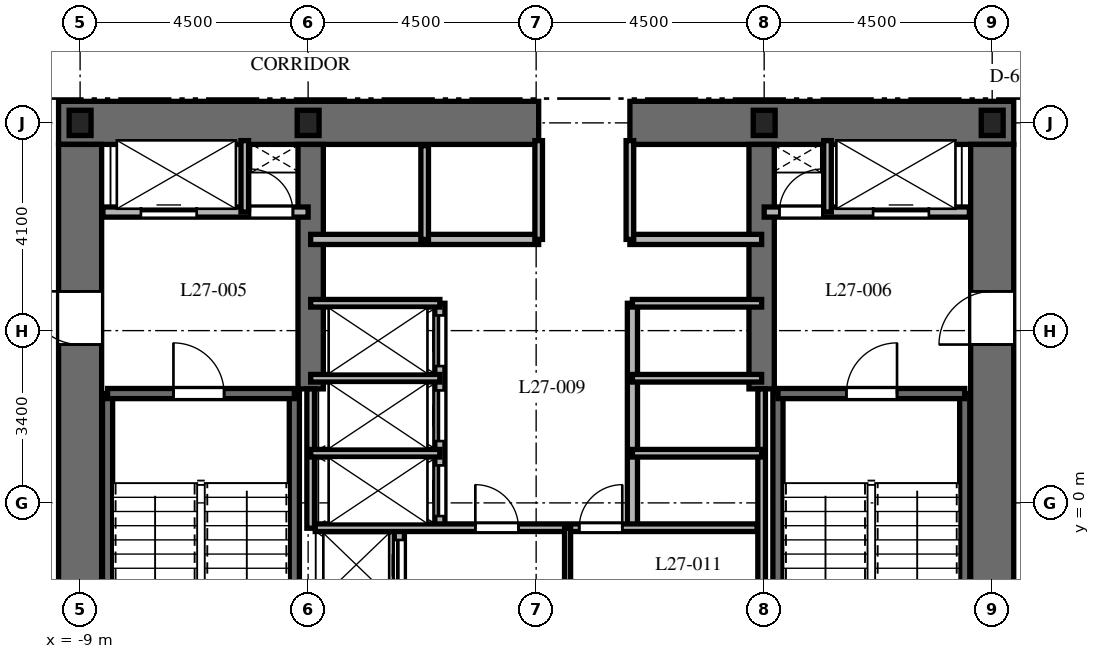
"""IFC4 building model, lengths in metres.
Left out: names, types, materials, properties, quantities, classifications, styles, units other than length and angle.
Written with IfcOpenShell. Run it as: python <this file> out.ifc"""

import sys

from ifc_helpers import new_model, si_unit, direction, frame, frame_2d, origin, origin_2d, place, context, subcontext, project, spatial, rectangle, i_section, extrude, element, fill, save


model = new_model("IFC4")
c1 = context("Model", 3, precision=1e-05, world=origin(), true_north=direction((0.0, 1.0)))
c2 = subcontext(c1, "Body", "Model", "MODEL_VIEW")
j1 = project(units=[si_unit("LENGTHUNIT", "METRE"), si_unit("PLANEANGLEUNIT", "RADIAN")], contexts=[c1])
p1 = place(None, origin())
s1 = spatial("IfcSite", under=j1, at=p1, CompositionType="ELEMENT")
p2 = place(p1, origin())
s2 = spatial("IfcBuilding", under=s1, at=p2, CompositionType="ELEMENT")
p3 = place(p2, frame((0.0, 0.0, 113.6)))
s3 = spatial("IfcBuildingStorey", under=s2, at=p3, CompositionType="ELEMENT", Elevation=113.6)
p4 = place(p3, frame((-9.425, 7.5, 0.0), z_axis=(0.0, 0.0, 1.0), x_axis=(1.0, 0.0, 0.0)))
e1 = element("IfcWall", 1, at=p4, inside=s3, PredefinedType="SHEAR", context=c2, shape_type="SweptSolid", body=[
    extrude(rectangle(XDim=9.475, YDim=0.85, at=frame_2d((4.738, 0.0))), origin(), (0.0, 0.0, 1.0), 3.7),
])
p5 = place(p3, frame((1.85, 7.5, 0.0), z_axis=(0.0, 0.0, 1.0), x_axis=(1.0, 0.0, 0.0)))
e2 = element("IfcWall", 2, at=p5, inside=s3, PredefinedType="SHEAR", context=c2, shape_type="SweptSolid", body=[
    extrude(rectangle(XDim=7.575, YDim=0.85, at=frame_2d((3.788, 0.0))), origin(), (0.0, 0.0, 1.0), 3.7),
])
p6 = place(p3, frame((-9.0, -7.075, 0.0), z_axis=(0.0, 0.0, 1.0), x_axis=(0.0, 1.0, 0.0)))
e3 = element("IfcWall", 3, at=p6, inside=s3, PredefinedType="SHEAR", context=c2, shape_type="SweptSolid", body=[
    extrude(rectangle(XDim=14.15, YDim=0.85, at=frame_2d((7.075, 0.0))), origin(), (0.0, 0.0, 1.0), 3.7),
])
p7 = place(p6, frame((10.2, 0.0, 0.0)))
e4 = element("IfcOpeningElement", 4, at=p7, cuts=e3, PredefinedType="OPENING", context=c2, shape_type="SweptSolid", body=[
    extrude(rectangle(XDim=1.05, YDim=2.15, at=frame_2d((0.525, 1.075))), frame((0.0, 0.435, 0.0), z_axis=(0.0, -1.0, 0.0), x_axis=(1.0, 0.0, 0.0)), (0.0, 0.0, 1.0), 0.87),
])
p8 = place(p3, frame((9.0, -7.075, 0.0), z_axis=(0.0, 0.0, 1.0), x_axis=(0.0, 1.0, 0.0)))
e5 = element("IfcWall", 5, at=p8, inside=s3, PredefinedType="SHEAR", context=c2, shape_type="SweptSolid", body=[
    extrude(rectangle(XDim=14.15, YDim=0.85, at=frame_2d((7.075, 0.0))), origin(), (0.0, 0.0, 1.0), 3.7),
])
p9 = place(p8, frame((10.2, 0.0, 0.0)))
e6 = element("IfcOpeningElement", 6, at=p9, cuts=e5, PredefinedType="OPENING", context=c2, shape_type="SweptSolid", body=[
    extrude(rectangle(XDim=1.05, YDim=2.15, at=frame_2d((0.525, 1.075))), frame((0.0, 0.435, 0.0), z_axis=(0.0, -1.0, 0.0), x_axis=(1.0, 0.0, 0.0)), (0.0, 0.0, 1.0), 0.87),
])
for number, where, z_axis, x_axis in (
    (7, (-4.45, 2.25, 0.0), (0.0, 0.0, 1.0), (0.0, 1.0, 0.0)),
    (8, (4.45, 2.25, 0.0), (0.0, 0.0, 1.0), (0.0, 1.0, 0.0)),
):
    element("IfcWall", number, at=place(p3, frame(where, z_axis=z_axis, x_axis=x_axis)), inside=s3, PredefinedType="SHEAR", context=c2, shape_type="SweptSolid", body=[
        extrude(rectangle(XDim=4.825, YDim=0.5, at=frame_2d((2.413, 0.0))), origin(), (0.0, 0.0, 1.0), 3.7),
    ])
for number, where, z_axis, x_axis in (
    (9, (-8.458, -6.985, 0.0), (0.0, 0.0, 1.0), (0.0, 1.0, 0.0)),
    (10, (-4.772, -6.985, 0.0), (0.0, 0.0, 1.0), (0.0, 1.0, 0.0)),
):
    element("IfcWall", number, at=place(p3, frame(where, z_axis=z_axis, x_axis=x_axis)), inside=s3, PredefinedType="SHEAR", context=c2, shape_type="SweptSolid", body=[
        extrude(rectangle(XDim=9.143, YDim=0.2, at=frame_2d((4.572, 0.0))), origin(), (0.0, 0.0, 1.0), 3.7),
    ])
p10 = place(p3, frame((-8.458, 2.158, 0.0), z_axis=(0.0, 0.0, 1.0), x_axis=(1.0, 0.0, 0.0)))
e11 = element("IfcWall", 11, at=p10, inside=s3, PredefinedType="SHEAR", context=c2, shape_type="SweptSolid", body=[
    extrude(rectangle(XDim=3.686, YDim=0.2, at=frame_2d((1.843, 0.0))), origin(), (0.0, 0.0, 1.0), 3.7),
])
p11 = place(p10, frame((1.3, 0.0, 0.0)))
e12 = element("IfcOpeningElement", 12, at=p11, cuts=e11, PredefinedType="OPENING", context=c2, shape_type="SweptSolid", body=[
    extrude(rectangle(XDim=1.0, YDim=2.15, at=frame_2d((0.5, 1.075))), frame((0.0, 0.11, 0.0), z_axis=(0.0, -1.0, 0.0), x_axis=(1.0, 0.0, 0.0)), (0.0, 0.0, 1.0), 0.22),
])
for number, where, z_axis, x_axis in (
    (13, (4.772, -6.985, 0.0), (0.0, 0.0, 1.0), (0.0, 1.0, 0.0)),
    (14, (8.458, -6.985, 0.0), (0.0, 0.0, 1.0), (0.0, 1.0, 0.0)),
):
    element("IfcWall", number, at=place(p3, frame(where, z_axis=z_axis, x_axis=x_axis)), inside=s3, PredefinedType="SHEAR", context=c2, shape_type="SweptSolid", body=[
        extrude(rectangle(XDim=9.143, YDim=0.2, at=frame_2d((4.572, 0.0))), origin(), (0.0, 0.0, 1.0), 3.7),
    ])
p12 = place(p3, frame((4.772, 2.158, 0.0), z_axis=(0.0, 0.0, 1.0), x_axis=(1.0, 0.0, 0.0)))
e15 = element("IfcWall", 15, at=p12, inside=s3, PredefinedType="SHEAR", context=c2, shape_type="SweptSolid", body=[
    extrude(rectangle(XDim=3.686, YDim=0.2, at=frame_2d((1.843, 0.0))), origin(), (0.0, 0.0, 1.0), 3.7),
])
p13 = place(p12, frame((1.35, 0.0, 0.0)))
e16 = element("IfcOpeningElement", 16, at=p13, cuts=e15, PredefinedType="OPENING", context=c2, shape_type="SweptSolid", body=[
    extrude(rectangle(XDim=1.0, YDim=2.15, at=frame_2d((0.5, 1.075))), frame((0.0, 0.11, 0.0), z_axis=(0.0, -1.0, 0.0), x_axis=(1.0, 0.0, 0.0)), (0.0, 0.0, 1.0), 0.22),
])
for number, where, z_axis, x_axis in (
    (17, (9.0, 7.5, 0.0), (0.0, 0.0, 1.0), (1.0, 0.0, 0.0)),
    (18, (4.5, 7.5, 0.0), (0.0, 0.0, 1.0), (1.0, 0.0, 0.0)),
    (19, (-4.5, 7.5, 0.0), (0.0, 0.0, 1.0), (1.0, 0.0, 0.0)),
    (20, (-9.0, 7.5, 0.0), (0.0, 0.0, 1.0), (1.0, 0.0, 0.0)),
):
    element("IfcColumn", number, at=place(p3, frame(where, z_axis=z_axis, x_axis=x_axis)), inside=s3, PredefinedType="COLUMN", context=c2, shape_type="SweptSolid", body=[
        extrude(i_section(OverallWidth=0.432, OverallDepth=0.498, WebThickness=0.056, FlangeThickness=0.089, at=origin_2d()), origin(), (0.0, 0.0, 1.0), 3.7),
    ])
p14 = place(p3, frame((-8.55, 5.74, 0.0), z_axis=(0.0, 0.0, 1.0), x_axis=(1.0, 0.0, 0.0)))
e21 = element("IfcWall", 21, at=p14, inside=s3, PredefinedType="PARTITIONING", context=c2, shape_type="SweptSolid", body=[
    extrude(rectangle(XDim=4.05, YDim=0.2, at=frame_2d((2.025, 0.0))), origin(), (0.0, 0.0, 1.0), 3.4),
])
p15 = place(p14, frame((0.75, 0.0, 0.0)))
e22 = element("IfcOpeningElement", 22, at=p15, cuts=e21, PredefinedType="OPENING", context=c2, shape_type="SweptSolid", body=[
    extrude(rectangle(XDim=1.1, YDim=2.2, at=frame_2d((0.55, 1.1))), frame((0.0, 0.11, 0.0), z_axis=(0.0, -1.0, 0.0), x_axis=(1.0, 0.0, 0.0)), (0.0, 0.0, 1.0), 0.22),
])
p16 = place(p14, frame((2.9, 0.0, 0.0)))
e23 = element("IfcOpeningElement", 23, at=p16, cuts=e21, PredefinedType="OPENING", context=c2, shape_type="SweptSolid", body=[
    extrude(rectangle(XDim=0.85, YDim=2.03, at=frame_2d((0.425, 1.015))), frame((0.0, 0.11, 0.0), z_axis=(0.0, -1.0, 0.0), x_axis=(1.0, 0.0, 0.0)), (0.0, 0.0, 1.0), 0.22),
])
p17 = place(p3, frame((-5.75, 5.74, 0.0), z_axis=(0.0, 0.0, 1.0), x_axis=(0.0, 1.0, 0.0)))
e24 = element("IfcWall", 24, at=p17, inside=s3, PredefinedType="PARTITIONING", context=c2, shape_type="SweptSolid", body=[
    extrude(rectangle(XDim=1.41, YDim=0.15, at=frame_2d((0.705, 0.0))), origin(), (0.0, 0.0, 1.0), 3.4),
])
p18 = place(p3, frame((4.5, 5.74, 0.0), z_axis=(0.0, 0.0, 1.0), x_axis=(1.0, 0.0, 0.0)))
e25 = element("IfcWall", 25, at=p18, inside=s3, PredefinedType="PARTITIONING", context=c2, shape_type="SweptSolid", body=[
    extrude(rectangle(XDim=4.05, YDim=0.2, at=frame_2d((2.025, 0.0))), origin(), (0.0, 0.0, 1.0), 3.4),
])
p19 = place(p18, frame((0.3, 0.0, 0.0)))
e26 = element("IfcOpeningElement", 26, at=p19, cuts=e25, PredefinedType="OPENING", context=c2, shape_type="SweptSolid", body=[
    extrude(rectangle(XDim=0.85, YDim=2.03, at=frame_2d((0.425, 1.015))), frame((0.0, 0.11, 0.0), z_axis=(0.0, -1.0, 0.0), x_axis=(1.0, 0.0, 0.0)), (0.0, 0.0, 1.0), 0.22),
])
p20 = place(p18, frame((2.15, 0.0, 0.0)))
e27 = element("IfcOpeningElement", 27, at=p20, cuts=e25, PredefinedType="OPENING", context=c2, shape_type="SweptSolid", body=[
    extrude(rectangle(XDim=1.1, YDim=2.2, at=frame_2d((0.55, 1.1))), frame((0.0, 0.11, 0.0), z_axis=(0.0, -1.0, 0.0), x_axis=(1.0, 0.0, 0.0)), (0.0, 0.0, 1.0), 0.22),
])
p21 = place(p3, frame((5.75, 5.74, 0.0), z_axis=(0.0, 0.0, 1.0), x_axis=(0.0, 1.0, 0.0)))
e28 = element("IfcWall", 28, at=p21, inside=s3, PredefinedType="PARTITIONING", context=c2, shape_type="SweptSolid", body=[
    extrude(rectangle(XDim=1.41, YDim=0.15, at=frame_2d((0.705, 0.0))), origin(), (0.0, 0.0, 1.0), 3.4),
])
p22 = place(p3, frame((-2.7, -1.972, 0.0), z_axis=(0.0, 0.0, 1.0), x_axis=(0.0, 1.0, 0.0)))
e29 = element("IfcWall", 29, at=p22, inside=s3, PredefinedType="PARTITIONING", context=c2, shape_type="SweptSolid", body=[
    extrude(rectangle(XDim=1.472, YDim=0.2, at=frame_2d((0.736, 0.0))), origin(), (0.0, 0.0, 1.0), 3.4),
])
p23 = place(p22, frame((0.24, 0.0, 0.0)))
e30 = element("IfcOpeningElement", 30, at=p23, cuts=e29, PredefinedType="OPENING", context=c2, shape_type="SweptSolid", body=[
    extrude(rectangle(XDim=1.0, YDim=2.2, at=frame_2d((0.5, 1.1))), frame((0.0, 0.11, 0.0), z_axis=(0.0, -1.0, 0.0), x_axis=(1.0, 0.0, 0.0)), (0.0, 0.0, 1.0), 0.22),
])
p24 = place(p3, frame((-4.45, 5.2, 0.0), z_axis=(0.0, 0.0, 1.0), x_axis=(1.0, 0.0, 0.0)))
e31 = element("IfcWall", 31, at=p24, inside=s3, PredefinedType="PARTITIONING", context=c2, shape_type="SweptSolid", body=[
    extrude(rectangle(XDim=4.5, YDim=0.2, at=frame_2d((2.25, 0.0))), origin(), (0.0, 0.0, 1.0), 3.4),
])
p25 = place(p3, frame((1.85, 5.2, 0.0), z_axis=(0.0, 0.0, 1.0), x_axis=(1.0, 0.0, 0.0)))
e32 = element("IfcWall", 32, at=p25, inside=s3, PredefinedType="PARTITIONING", context=c2, shape_type="SweptSolid", body=[
    extrude(rectangle(XDim=2.6, YDim=0.2, at=frame_2d((1.3, 0.0))), origin(), (0.0, 0.0, 1.0), 3.4),
])
p26 = place(p3, frame((-2.2, 5.2, 0.0), z_axis=(0.0, 0.0, 1.0), x_axis=(0.0, 1.0, 0.0)))
e33 = element("IfcWall", 33, at=p26, inside=s3, PredefinedType="PARTITIONING", context=c2, shape_type="SweptSolid", body=[
    extrude(rectangle(XDim=1.85, YDim=0.15, at=frame_2d((0.925, 0.0))), origin(), (0.0, 0.0, 1.0), 3.4),
])
for number, where, z_axis, x_axis in (
    (34, (0.05, 5.2, 0.0), (0.0, 0.0, 1.0), (0.0, 1.0, 0.0)),
    (35, (1.85, 5.2, 0.0), (0.0, 0.0, 1.0), (0.0, 1.0, 0.0)),
):
    element("IfcWall", number, at=place(p3, frame(where, z_axis=z_axis, x_axis=x_axis)), inside=s3, PredefinedType="PARTITIONING", context=c2, shape_type="SweptSolid", body=[
        extrude(rectangle(XDim=1.95, YDim=0.15, at=frame_2d((0.975, 0.0))), origin(), (0.0, 0.0, 1.0), 3.4),
    ])
p27 = place(p3, frame((-4.45, -0.5, 0.0), z_axis=(0.0, 0.0, 1.0), x_axis=(0.0, 1.0, 0.0)))
e36 = element("IfcWall", 36, at=p27, inside=s3, PredefinedType="PARTITIONING", context=c2, shape_type="SweptSolid", body=[
    extrude(rectangle(XDim=2.75, YDim=0.15, at=frame_2d((1.375, 0.0))), origin(), (0.0, 0.0, 1.0), 3.4),
])
p28 = place(p3, frame((4.45, -1.972, 0.0), z_axis=(0.0, 0.0, 1.0), x_axis=(0.0, 1.0, 0.0)))
e37 = element("IfcWall", 37, at=p28, inside=s3, PredefinedType="PARTITIONING", context=c2, shape_type="SweptSolid", body=[
    extrude(rectangle(XDim=4.222, YDim=0.15, at=frame_2d((2.111, 0.0))), origin(), (0.0, 0.0, 1.0), 3.4),
])
p29 = place(p3, frame((-1.9, -0.5, 0.0), z_axis=(0.0, 0.0, 1.0), x_axis=(0.0, 1.0, 0.0)))
e38 = element("IfcWall", 38, at=p29, inside=s3, PredefinedType="PARTITIONING", context=c2, shape_type="SweptSolid", body=[
    extrude(rectangle(XDim=4.44, YDim=0.2, at=frame_2d((2.22, 0.0))), origin(), (0.0, 0.0, 1.0), 3.4),
])
p30 = place(p29, frame((0.24, 0.0, 0.0)))
e39 = element("IfcOpeningElement", 39, at=p30, cuts=e38, PredefinedType="OPENING", context=c2, shape_type="SweptSolid", body=[
    extrude(rectangle(XDim=1.0, YDim=2.2, at=frame_2d((0.5, 1.1))), frame((0.0, 0.11, 0.0), z_axis=(0.0, -1.0, 0.0), x_axis=(1.0, 0.0, 0.0)), (0.0, 0.0, 1.0), 0.22),
])
p31 = place(p29, frame((1.72, 0.0, 0.0)))
e40 = element("IfcOpeningElement", 40, at=p31, cuts=e38, PredefinedType="OPENING", context=c2, shape_type="SweptSolid", body=[
    extrude(rectangle(XDim=1.0, YDim=2.2, at=frame_2d((0.5, 1.1))), frame((0.0, 0.11, 0.0), z_axis=(0.0, -1.0, 0.0), x_axis=(1.0, 0.0, 0.0)), (0.0, 0.0, 1.0), 0.22),
])
p32 = place(p29, frame((3.2, 0.0, 0.0)))
e41 = element("IfcOpeningElement", 41, at=p32, cuts=e38, PredefinedType="OPENING", context=c2, shape_type="SweptSolid", body=[
    extrude(rectangle(XDim=1.0, YDim=2.2, at=frame_2d((0.5, 1.1))), frame((0.0, 0.11, 0.0), z_axis=(0.0, -1.0, 0.0), x_axis=(1.0, 0.0, 0.0)), (0.0, 0.0, 1.0), 0.22),
])
for number, where, z_axis, x_axis in (
    (42, (-4.45, 3.94, 0.0), (0.0, 0.0, 1.0), (1.0, 0.0, 0.0)),
    (43, (-4.45, 0.98, 0.0), (0.0, 0.0, 1.0), (1.0, 0.0, 0.0)),
    (44, (-4.45, 2.46, 0.0), (0.0, 0.0, 1.0), (1.0, 0.0, 0.0)),
):
    element("IfcWall", number, at=place(p3, frame(where, z_axis=z_axis, x_axis=x_axis)), inside=s3, PredefinedType="PARTITIONING", context=c2, shape_type="SweptSolid", body=[
        extrude(rectangle(XDim=2.55, YDim=0.15, at=frame_2d((1.275, 0.0))), origin(), (0.0, 0.0, 1.0), 3.4),
    ])
p33 = place(p3, frame((1.9, -0.5, 0.0), z_axis=(0.0, 0.0, 1.0), x_axis=(0.0, 1.0, 0.0)))
e45 = element("IfcWall", 45, at=p33, inside=s3, PredefinedType="PARTITIONING", context=c2, shape_type="SweptSolid", body=[
    extrude(rectangle(XDim=4.44, YDim=0.2, at=frame_2d((2.22, 0.0))), origin(), (0.0, 0.0, 1.0), 3.4),
])
for number, where, z_axis, x_axis in (
    (46, (1.9, 3.94, 0.0), (0.0, 0.0, 1.0), (1.0, 0.0, 0.0)),
    (47, (1.9, 0.98, 0.0), (0.0, 0.0, 1.0), (1.0, 0.0, 0.0)),
    (48, (1.9, 2.46, 0.0), (0.0, 0.0, 1.0), (1.0, 0.0, 0.0)),
):
    element("IfcWall", number, at=place(p3, frame(where, z_axis=z_axis, x_axis=x_axis)), inside=s3, PredefinedType="PARTITIONING", context=c2, shape_type="SweptSolid", body=[
        extrude(rectangle(XDim=2.55, YDim=0.15, at=frame_2d((1.275, 0.0))), origin(), (0.0, 0.0, 1.0), 3.4),
    ])
p34 = place(p3, frame((-4.36, -0.49, 0.0), z_axis=(0.0, 0.0, 1.0), x_axis=(1.0, 0.0, 0.0)))
e49 = element("IfcWall", 49, at=p34, inside=s3, PredefinedType="PARTITIONING", context=c2, shape_type="SweptSolid", body=[
    extrude(rectangle(XDim=8.72, YDim=0.15, at=frame_2d((4.36, 0.0))), origin(), (0.0, 0.0, 1.0), 3.4),
])
p35 = place(p34, frame((3.16, 0.0, 0.0)))
e50 = element("IfcOpeningElement", 50, at=p35, cuts=e49, PredefinedType="OPENING", context=c2, shape_type="SweptSolid", body=[
    extrude(rectangle(XDim=0.85, YDim=2.03, at=frame_2d((0.425, 1.015))), frame((0.0, 0.085, 0.0), z_axis=(0.0, -1.0, 0.0), x_axis=(1.0, 0.0, 0.0)), (0.0, 0.0, 1.0), 0.17),
])
p36 = place(p34, frame((5.21, 0.0, 0.0)))
e51 = element("IfcOpeningElement", 51, at=p36, cuts=e49, PredefinedType="OPENING", context=c2, shape_type="SweptSolid", body=[
    extrude(rectangle(XDim=0.85, YDim=2.03, at=frame_2d((0.425, 1.015))), frame((0.0, 0.085, 0.0), z_axis=(0.0, -1.0, 0.0), x_axis=(1.0, 0.0, 0.0)), (0.0, 0.0, 1.0), 0.17),
])
p37 = place(p3, frame((0.62, -1.972, 0.0), z_axis=(0.0, 0.0, 1.0), x_axis=(0.0, 1.0, 0.0)))
e52 = element("IfcWall", 52, at=p37, inside=s3, PredefinedType="PARTITIONING", context=c2, shape_type="SweptSolid", body=[
    extrude(rectangle(XDim=1.472, YDim=0.12, at=frame_2d((0.736, 0.0))), origin(), (0.0, 0.0, 1.0), 3.4),
])
p38 = place(p11, origin())
e53 = element("IfcDoor", 53, at=p38, inside=s3, OperationType="SINGLE_SWING_LEFT", PredefinedType="DOOR", context=c2, shape_type="SweptSolid", body=[
    extrude(rectangle(XDim=1.0, YDim=2.15, at=frame_2d((0.5, 1.075))), frame((0.0, 0.025, 0.0), z_axis=(0.0, -1.0, 0.0), x_axis=(1.0, 0.0, 0.0)), (0.0, 0.0, 1.0), 0.05),
])
fill(e12, e53)
p39 = place(p13, origin())
e54 = element("IfcDoor", 54, at=p39, inside=s3, OperationType="SINGLE_SWING_RIGHT", PredefinedType="DOOR", context=c2, shape_type="SweptSolid", body=[
    extrude(rectangle(XDim=1.0, YDim=2.15, at=frame_2d((0.5, 1.075))), frame((0.0, 0.025, 0.0), z_axis=(0.0, -1.0, 0.0), x_axis=(1.0, 0.0, 0.0)), (0.0, 0.0, 1.0), 0.05),
])
fill(e16, e54)
p40 = place(p7, origin())
e55 = element("IfcDoor", 55, at=p40, inside=s3, OperationType="SINGLE_SWING_RIGHT", PredefinedType="DOOR", context=c2, shape_type="SweptSolid", body=[
    extrude(rectangle(XDim=1.05, YDim=2.15, at=frame_2d((0.525, 1.075))), frame((0.0, 0.025, 0.0), z_axis=(0.0, -1.0, 0.0), x_axis=(1.0, 0.0, 0.0)), (0.0, 0.0, 1.0), 0.05),
])
fill(e4, e55)
p41 = place(p9, origin())
e56 = element("IfcDoor", 56, at=p41, inside=s3, OperationType="SINGLE_SWING_LEFT", PredefinedType="DOOR", context=c2, shape_type="SweptSolid", body=[
    extrude(rectangle(XDim=1.05, YDim=2.15, at=frame_2d((0.525, 1.075))), frame((0.0, 0.025, 0.0), z_axis=(0.0, -1.0, 0.0), x_axis=(1.0, 0.0, 0.0)), (0.0, 0.0, 1.0), 0.05),
])
fill(e6, e56)
p42 = place(p15, origin())
e57 = element("IfcDoor", 57, at=p42, inside=s3, OperationType="SLIDING_TO_LEFT", PredefinedType="DOOR", context=c2, shape_type="SweptSolid", body=[
    extrude(rectangle(XDim=1.1, YDim=2.2, at=frame_2d((0.55, 1.1))), frame((0.0, 0.025, 0.0), z_axis=(0.0, -1.0, 0.0), x_axis=(1.0, 0.0, 0.0)), (0.0, 0.0, 1.0), 0.05),
])
fill(e22, e57)
p43 = place(p16, origin())
e58 = element("IfcDoor", 58, at=p43, inside=s3, OperationType="SINGLE_SWING_LEFT", PredefinedType="DOOR", context=c2, shape_type="SweptSolid", body=[
    extrude(rectangle(XDim=0.85, YDim=2.03, at=frame_2d((0.425, 1.015))), frame((0.0, 0.025, 0.0), z_axis=(0.0, -1.0, 0.0), x_axis=(1.0, 0.0, 0.0)), (0.0, 0.0, 1.0), 0.05),
])
fill(e23, e58)
p44 = place(p19, origin())
e59 = element("IfcDoor", 59, at=p44, inside=s3, OperationType="SINGLE_SWING_RIGHT", PredefinedType="DOOR", context=c2, shape_type="SweptSolid", body=[
    extrude(rectangle(XDim=0.85, YDim=2.03, at=frame_2d((0.425, 1.015))), frame((0.0, 0.025, 0.0), z_axis=(0.0, -1.0, 0.0), x_axis=(1.0, 0.0, 0.0)), (0.0, 0.0, 1.0), 0.05),
])
fill(e26, e59)
p45 = place(p20, origin())
e60 = element("IfcDoor", 60, at=p45, inside=s3, OperationType="SLIDING_TO_RIGHT", PredefinedType="DOOR", context=c2, shape_type="SweptSolid", body=[
    extrude(rectangle(XDim=1.1, YDim=2.2, at=frame_2d((0.55, 1.1))), frame((0.0, 0.025, 0.0), z_axis=(0.0, -1.0, 0.0), x_axis=(1.0, 0.0, 0.0)), (0.0, 0.0, 1.0), 0.05),
])
fill(e27, e60)
p46 = place(p23, origin())
e61 = element("IfcDoor", 61, at=p46, inside=s3, OperationType="SLIDING_TO_LEFT", PredefinedType="DOOR", context=c2, shape_type="SweptSolid", body=[
    extrude(rectangle(XDim=1.0, YDim=2.2, at=frame_2d((0.5, 1.1))), frame((0.0, 0.025, 0.0), z_axis=(0.0, -1.0, 0.0), x_axis=(1.0, 0.0, 0.0)), (0.0, 0.0, 1.0), 0.05),
])
fill(e30, e61)
p47 = place(p30, origin())
e62 = element("IfcDoor", 62, at=p47, inside=s3, OperationType="SLIDING_TO_LEFT", PredefinedType="DOOR", context=c2, shape_type="SweptSolid", body=[
    extrude(rectangle(XDim=1.0, YDim=2.2, at=frame_2d((0.5, 1.1))), frame((0.0, 0.025, 0.0), z_axis=(0.0, -1.0, 0.0), x_axis=(1.0, 0.0, 0.0)), (0.0, 0.0, 1.0), 0.05),
])
fill(e39, e62)
p48 = place(p31, origin())
e63 = element("IfcDoor", 63, at=p48, inside=s3, OperationType="SLIDING_TO_LEFT", PredefinedType="DOOR", context=c2, shape_type="SweptSolid", body=[
    extrude(rectangle(XDim=1.0, YDim=2.2, at=frame_2d((0.5, 1.1))), frame((0.0, 0.025, 0.0), z_axis=(0.0, -1.0, 0.0), x_axis=(1.0, 0.0, 0.0)), (0.0, 0.0, 1.0), 0.05),
])
fill(e40, e63)
p49 = place(p32, origin())
e64 = element("IfcDoor", 64, at=p49, inside=s3, OperationType="SLIDING_TO_LEFT", PredefinedType="DOOR", context=c2, shape_type="SweptSolid", body=[
    extrude(rectangle(XDim=1.0, YDim=2.2, at=frame_2d((0.5, 1.1))), frame((0.0, 0.025, 0.0), z_axis=(0.0, -1.0, 0.0), x_axis=(1.0, 0.0, 0.0)), (0.0, 0.0, 1.0), 0.05),
])
fill(e41, e64)
p50 = place(p35, origin())
e65 = element("IfcDoor", 65, at=p50, inside=s3, OperationType="SINGLE_SWING_LEFT", PredefinedType="DOOR", context=c2, shape_type="SweptSolid", body=[
    extrude(rectangle(XDim=0.85, YDim=2.03, at=frame_2d((0.425, 1.015))), frame((0.0, 0.025, 0.0), z_axis=(0.0, -1.0, 0.0), x_axis=(1.0, 0.0, 0.0)), (0.0, 0.0, 1.0), 0.05),
])
fill(e50, e65)
p51 = place(p36, origin())
e66 = element("IfcDoor", 66, at=p51, inside=s3, OperationType="SINGLE_SWING_RIGHT", PredefinedType="DOOR", context=c2, shape_type="SweptSolid", body=[
    extrude(rectangle(XDim=0.85, YDim=2.03, at=frame_2d((0.425, 1.015))), frame((0.0, 0.025, 0.0), z_axis=(0.0, -1.0, 0.0), x_axis=(1.0, 0.0, 0.0)), (0.0, 0.0, 1.0), 0.05),
])
fill(e51, e66)
save(model, sys.argv[1])
